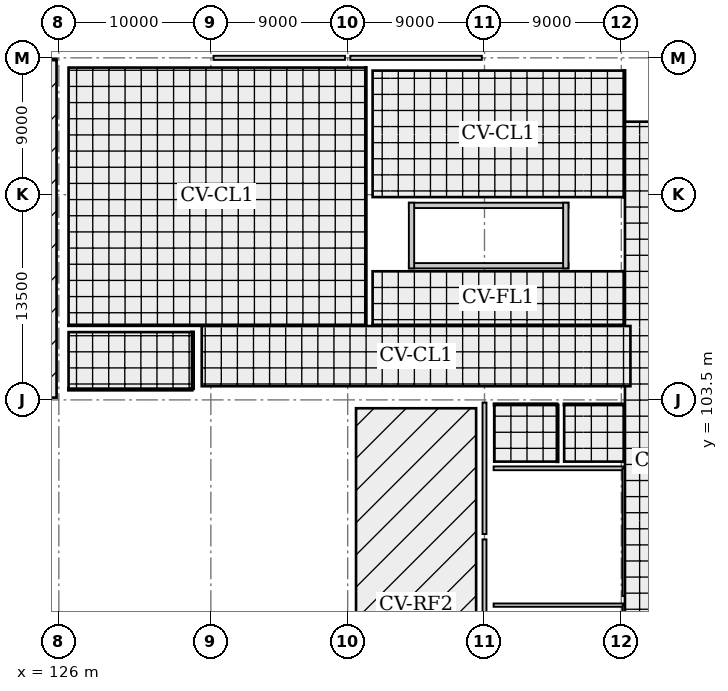
"""IFC4 building model, lengths in metres.
Left out: names, types, materials, properties, quantities, classifications, styles, units other than length and angle.
Written with IfcOpenShell. Run it as: python <this file> out.ifc"""

import sys

from ifc_helpers import new_model, si_unit, direction, frame, frame_2d, origin, origin_2d, place, context, subcontext, project, spatial, rectangle, i_section, extrude, element, fill, save


model = new_model("IFC4")
c1 = context("Model", 3, precision=1e-05, world=origin(), true_north=direction((0.0, 1.0)))
c2 = subcontext(c1, "Body", "Model", "MODEL_VIEW")
j1 = project(units=[si_unit("LENGTHUNIT", "METRE"), si_unit("PLANEANGLEUNIT", "RADIAN")], contexts=[c1])
p1 = place(None, origin())
s1 = spatial("IfcSite", under=j1, at=p1, CompositionType="ELEMENT")
p2 = place(p1, origin())
s2 = spatial("IfcBuilding", under=s1, at=p2, CompositionType="ELEMENT")
p3 = place(p2, frame((0.0, 0.0, 17.6)))
s3 = spatial("IfcBuildingStorey", under=s2, at=p3, CompositionType="ELEMENT", Elevation=17.6)
p4 = place(p3, frame((126.0, 103.5, 0.0), z_axis=(0.0, 0.0, 1.0), x_axis=(1.0, 0.0, 0.0)))
e1 = element("IfcColumn", 1, at=p4, inside=s3, PredefinedType="COLUMN", context=c2, shape_type="SweptSolid", body=[
    extrude(rectangle(XDim=0.9, YDim=0.9, at=origin_2d()), origin(), (0.0, 0.0, 1.0), 3.2),
])
for number, where, z_axis, x_axis in (
    (2, (126.0, 117.0, 0.0), (0.0, 0.0, 1.0), (1.0, 0.0, 0.0)),
    (3, (126.0, 126.0, 0.0), (0.0, 0.0, 1.0), (1.0, 0.0, 0.0)),
    (4, (136.0, 103.5, 0.0), (0.0, 0.0, 1.0), (1.0, 0.0, 0.0)),
    (5, (136.0, 117.0, 0.0), (0.0, 0.0, 1.0), (1.0, 0.0, 0.0)),
    (6, (136.0, 126.0, 0.0), (0.0, 0.0, 1.0), (1.0, 0.0, 0.0)),
    (7, (145.0, 103.5, 0.0), (0.0, 0.0, 1.0), (1.0, 0.0, 0.0)),
    (8, (145.0, 117.0, 0.0), (0.0, 0.0, 1.0), (1.0, 0.0, 0.0)),
    (9, (145.0, 126.0, 0.0), (0.0, 0.0, 1.0), (1.0, 0.0, 0.0)),
    (10, (154.0, 94.5, 0.0), (0.0, 0.0, 1.0), (1.0, 0.0, 0.0)),
    (11, (154.0, 103.5, 0.0), (0.0, 0.0, 1.0), (1.0, 0.0, 0.0)),
    (12, (154.0, 117.0, 0.0), (0.0, 0.0, 1.0), (1.0, 0.0, 0.0)),
    (13, (154.0, 126.0, 0.0), (0.0, 0.0, 1.0), (1.0, 0.0, 0.0)),
    (14, (163.0, 94.5, 0.0), (0.0, 0.0, 1.0), (1.0, 0.0, 0.0)),
    (15, (163.0, 103.5, 0.0), (0.0, 0.0, 1.0), (1.0, 0.0, 0.0)),
    (16, (163.0, 117.0, 0.0), (0.0, 0.0, 1.0), (1.0, 0.0, 0.0)),
    (17, (163.0, 126.0, 0.0), (0.0, 0.0, 1.0), (1.0, 0.0, 0.0)),
):
    element("IfcColumn", number, at=place(p3, frame(where, z_axis=z_axis, x_axis=x_axis)), inside=s3, PredefinedType="COLUMN", context=c2, shape_type="SweptSolid", body=[
        extrude(i_section(OverallWidth=0.35, OverallDepth=0.35, WebThickness=0.012, FlangeThickness=0.019, FilletRadius=0.02, at=origin_2d()), origin(), (0.0, 0.0, 1.0), 3.2),
    ])
p5 = place(p3, frame((136.175, 126.0, 0.0), z_axis=(0.0, 0.0, 1.0), x_axis=(1.0, 0.0, 0.0)))
e18 = element("IfcWall", 18, at=p5, inside=s3, PredefinedType="SOLIDWALL", context=c2, shape_type="SweptSolid", body=[
    extrude(rectangle(XDim=8.65, YDim=0.27, at=frame_2d((4.325, 0.0))), origin(), (0.0, 0.0, 1.0), 2.535),
])
p6 = place(p5, frame((1.69, 0.0, 0.9)))
e19 = element("IfcOpeningElement", 19, at=p6, cuts=e18, PredefinedType="OPENING", context=c2, shape_type="SweptSolid", body=[
    extrude(rectangle(XDim=1.15, YDim=1.45, at=frame_2d((0.575, 0.725))), frame((0.0, 0.145, 0.0), z_axis=(0.0, -1.0, 0.0), x_axis=(1.0, 0.0, 0.0)), (0.0, 0.0, 1.0), 0.29),
])
p7 = place(p5, frame((5.81, 0.0, 0.9)))
e20 = element("IfcOpeningElement", 20, at=p7, cuts=e18, PredefinedType="OPENING", context=c2, shape_type="SweptSolid", body=[
    extrude(rectangle(XDim=1.15, YDim=1.45, at=frame_2d((0.575, 0.725))), frame((0.0, 0.145, 0.0), z_axis=(0.0, -1.0, 0.0), x_axis=(1.0, 0.0, 0.0)), (0.0, 0.0, 1.0), 0.29),
])
p8 = place(p3, frame((145.175, 126.0, 0.0), z_axis=(0.0, 0.0, 1.0), x_axis=(1.0, 0.0, 0.0)))
e21 = element("IfcWall", 21, at=p8, inside=s3, PredefinedType="SOLIDWALL", context=c2, shape_type="SweptSolid", body=[
    extrude(rectangle(XDim=8.65, YDim=0.27, at=frame_2d((4.325, 0.0))), origin(), (0.0, 0.0, 1.0), 2.535),
])
p9 = place(p8, frame((1.69, 0.0, 0.9)))
e22 = element("IfcOpeningElement", 22, at=p9, cuts=e21, PredefinedType="OPENING", context=c2, shape_type="SweptSolid", body=[
    extrude(rectangle(XDim=1.15, YDim=1.45, at=frame_2d((0.575, 0.725))), frame((0.0, 0.145, 0.0), z_axis=(0.0, -1.0, 0.0), x_axis=(1.0, 0.0, 0.0)), (0.0, 0.0, 1.0), 0.29),
])
p10 = place(p8, frame((5.81, 0.0, 0.9)))
e23 = element("IfcOpeningElement", 23, at=p10, cuts=e21, PredefinedType="OPENING", context=c2, shape_type="SweptSolid", body=[
    extrude(rectangle(XDim=1.15, YDim=1.45, at=frame_2d((0.575, 0.725))), frame((0.0, 0.145, 0.0), z_axis=(0.0, -1.0, 0.0), x_axis=(1.0, 0.0, 0.0)), (0.0, 0.0, 1.0), 0.29),
])
p11 = place(p3, frame((154.0, 85.675, 0.0), z_axis=(0.0, 0.0, 1.0), x_axis=(0.0, 1.0, 0.0)))
e24 = element("IfcWall", 24, at=p11, inside=s3, PredefinedType="SOLIDWALL", context=c2, shape_type="SweptSolid", body=[
    extrude(rectangle(XDim=8.65, YDim=0.26, at=frame_2d((4.325, 0.0))), origin(), (0.0, 0.0, 1.0), 2.505),
])
p12 = place(p11, frame((3.625, 0.0, 0.75)))
e25 = element("IfcOpeningElement", 25, at=p12, cuts=e24, PredefinedType="OPENING", context=c2, shape_type="SweptSolid", body=[
    extrude(rectangle(XDim=1.4, YDim=1.55, at=frame_2d((0.7, 0.775))), frame((0.0, 0.14, 0.0), z_axis=(0.0, -1.0, 0.0), x_axis=(1.0, 0.0, 0.0)), (0.0, 0.0, 1.0), 0.28),
])
p13 = place(p3, frame((154.0, 94.675, 0.0), z_axis=(0.0, 0.0, 1.0), x_axis=(0.0, 1.0, 0.0)))
e26 = element("IfcWall", 26, at=p13, inside=s3, PredefinedType="SOLIDWALL", context=c2, shape_type="SweptSolid", body=[
    extrude(rectangle(XDim=8.65, YDim=0.26, at=frame_2d((4.325, 0.0))), origin(), (0.0, 0.0, 1.0), 2.505),
])
p14 = place(p13, frame((3.625, 0.0, 0.75)))
e27 = element("IfcOpeningElement", 27, at=p14, cuts=e26, PredefinedType="OPENING", context=c2, shape_type="SweptSolid", body=[
    extrude(rectangle(XDim=1.4, YDim=1.55, at=frame_2d((0.7, 0.775))), frame((0.0, 0.14, 0.0), z_axis=(0.0, -1.0, 0.0), x_axis=(1.0, 0.0, 0.0)), (0.0, 0.0, 1.0), 0.28),
])
p15 = place(p3, frame((117.15, 104.05, 0.0), z_axis=(0.0, 0.0, 1.0), x_axis=(1.0, 0.0, 0.0)))
e28 = element("IfcWall", 28, at=p15, inside=s3, PredefinedType="PARAPET", context=c2, shape_type="SweptSolid", body=[
    extrude(rectangle(XDim=8.7, YDim=0.18, at=frame_2d((4.35, 0.0))), origin(), (0.0, 0.0, 1.0), 0.85),
])
p16 = place(p3, frame((117.15, 125.85, 0.0), z_axis=(0.0, 0.0, 1.0), x_axis=(1.0, 0.0, 0.0)))
e29 = element("IfcWall", 29, at=p16, inside=s3, PredefinedType="PARAPET", context=c2, shape_type="SweptSolid", body=[
    extrude(rectangle(XDim=8.7, YDim=0.18, at=frame_2d((4.35, 0.0))), origin(), (0.0, 0.0, 1.0), 1.15),
])
p17 = place(p3, frame((149.025, 112.325, 0.0), z_axis=(0.0, 0.0, 1.0), x_axis=(1.0, 0.0, 0.0)))
e30 = element("IfcWall", 30, at=p17, inside=s3, PredefinedType="SHEAR", context=c2, shape_type="SweptSolid", body=[
    extrude(rectangle(XDim=10.498, YDim=0.35, at=frame_2d((5.249, 0.0))), origin(), (0.0, 0.0, 1.0), 3.02),
])
p18 = place(p17, frame((0.55, 0.0, 0.0)))
e31 = element("IfcOpeningElement", 31, at=p18, cuts=e30, PredefinedType="OPENING", context=c2, shape_type="SweptSolid", body=[
    extrude(rectangle(XDim=1.3, YDim=2.1, at=frame_2d((0.65, 1.05))), frame((0.0, 0.185, 0.0), z_axis=(0.0, -1.0, 0.0), x_axis=(1.0, 0.0, 0.0)), (0.0, 0.0, 1.0), 0.37),
])
p19 = place(p3, frame((159.522, 116.295, 0.0), z_axis=(0.0, 0.0, 1.0), x_axis=(-1.0, 0.0, 0.0)))
e32 = element("IfcWall", 32, at=p19, inside=s3, PredefinedType="SHEAR", context=c2, shape_type="SweptSolid", body=[
    extrude(rectangle(XDim=10.498, YDim=0.35, at=frame_2d((5.249, 0.0))), origin(), (0.0, 0.0, 1.0), 3.02),
])
for number, where, z_axis, x_axis in (
    (33, (159.347, 112.15, 0.0), (0.0, 0.0, 1.0), (0.0, 1.0, 0.0)),
    (34, (149.2, 116.47, 0.0), (0.0, 0.0, 1.0), (0.0, -1.0, 0.0)),
):
    element("IfcWall", number, at=place(p3, frame(where, z_axis=z_axis, x_axis=x_axis)), inside=s3, PredefinedType="SHEAR", context=c2, shape_type="SweptSolid", body=[
        extrude(rectangle(XDim=4.32, YDim=0.35, at=frame_2d((2.16, 0.0))), origin(), (0.0, 0.0, 1.0), 3.02),
    ])
p20 = place(p3, frame((146.2, 108.4, 0.0), z_axis=(0.0, 0.0, 1.0), x_axis=(-1.0, 0.0, 0.0)))
e35 = element("IfcWall", 35, at=p20, inside=s3, PredefinedType="PARTITIONING", context=c2, shape_type="SweptSolid", body=[
    extrude(rectangle(XDim=19.6, YDim=0.11, at=frame_2d((9.8, 0.0))), origin(), (0.0, 0.0, 1.0), 2.395),
])
p21 = place(p20, frame((9.05, 0.0, 0.0)))
e36 = element("IfcOpeningElement", 36, at=p21, cuts=e35, PredefinedType="OPENING", context=c2, shape_type="SweptSolid", body=[
    extrude(rectangle(XDim=1.5, YDim=2.15, at=frame_2d((0.75, 1.075))), frame((0.0, 0.065, 0.0), z_axis=(0.0, -1.0, 0.0), x_axis=(1.0, 0.0, 0.0)), (0.0, 0.0, 1.0), 0.13),
])
p22 = place(p3, frame((146.2, 125.4, 0.0), z_axis=(0.0, 0.0, 1.0), x_axis=(0.0, -1.0, 0.0)))
e37 = element("IfcWall", 37, at=p22, inside=s3, PredefinedType="PARTITIONING", context=c2, shape_type="SweptSolid", body=[
    extrude(rectangle(XDim=17.0, YDim=0.11, at=frame_2d((8.5, 0.0))), origin(), (0.0, 0.0, 1.0), 2.535),
])
p23 = place(p3, frame((154.6, 90.0, 0.0), z_axis=(0.0, 0.0, 1.0), x_axis=(1.0, 0.0, 0.0)))
e38 = element("IfcWall", 38, at=p23, inside=s3, PredefinedType="SOLIDWALL", context=c2, shape_type="SweptSolid", body=[
    extrude(rectangle(XDim=8.6, YDim=0.22, at=frame_2d((4.3, 0.0))), origin(), (0.0, 0.0, 1.0), 2.555),
])
p24 = place(p3, frame((163.2, 90.0, 0.0), z_axis=(0.0, 0.0, 1.0), x_axis=(0.0, -1.0, 0.0)))
e39 = element("IfcWall", 39, at=p24, inside=s3, PredefinedType="SOLIDWALL", context=c2, shape_type="SweptSolid", body=[
    extrude(rectangle(XDim=13.0, YDim=0.22, at=frame_2d((6.5, 0.0))), origin(), (0.0, 0.0, 1.0), 2.505),
])
p25 = place(p24, frame((5.85, 0.0, 0.0)))
e40 = element("IfcOpeningElement", 40, at=p25, cuts=e39, PredefinedType="OPENING", context=c2, shape_type="SweptSolid", body=[
    extrude(rectangle(XDim=1.3, YDim=2.1, at=frame_2d((0.65, 1.05))), frame((0.0, 0.12, 0.0), z_axis=(0.0, -1.0, 0.0), x_axis=(1.0, 0.0, 0.0)), (0.0, 0.0, 1.0), 0.24),
])
p26 = place(p3, frame((154.6, 99.0, 0.0), z_axis=(0.0, 0.0, 1.0), x_axis=(1.0, 0.0, 0.0)))
e41 = element("IfcWall", 41, at=p26, inside=s3, PredefinedType="SOLIDWALL", context=c2, shape_type="SweptSolid", body=[
    extrude(rectangle(XDim=8.6, YDim=0.25, at=frame_2d((4.3, 0.0))), origin(), (0.0, 0.0, 1.0), 2.555),
])
p27 = place(p3, frame((163.2, 99.0, 0.0), z_axis=(0.0, 0.0, 1.0), x_axis=(0.0, -1.0, 0.0)))
e42 = element("IfcWall", 42, at=p27, inside=s3, PredefinedType="SOLIDWALL", context=c2, shape_type="SweptSolid", body=[
    extrude(rectangle(XDim=8.4, YDim=0.25, at=frame_2d((4.2, 0.0))), origin(), (0.0, 0.0, 1.0), 2.505),
])
p28 = place(p27, frame((2.55, 0.0, 0.0)))
e43 = element("IfcOpeningElement", 43, at=p28, cuts=e42, PredefinedType="OPENING", context=c2, shape_type="SweptSolid", body=[
    extrude(rectangle(XDim=1.3, YDim=2.1, at=frame_2d((0.65, 1.05))), frame((0.0, 0.135, 0.0), z_axis=(0.0, -1.0, 0.0), x_axis=(1.0, 0.0, 0.0)), (0.0, 0.0, 1.0), 0.27),
])
p29 = place(p3, frame((163.2, 125.2, 0.0), z_axis=(0.0, 0.0, 1.0), x_axis=(0.0, -1.0, 0.0)))
e44 = element("IfcWall", 44, at=p29, inside=s3, PredefinedType="PARTITIONING", context=c2, shape_type="SweptSolid", body=[
    extrude(rectangle(XDim=8.4, YDim=0.15, at=frame_2d((4.2, 0.0))), origin(), (0.0, 0.0, 1.0), 2.355),
])
p30 = place(p29, frame((3.575, 0.0, 0.0)))
e45 = element("IfcOpeningElement", 45, at=p30, cuts=e44, PredefinedType="OPENING", context=c2, shape_type="SweptSolid", body=[
    extrude(rectangle(XDim=1.25, YDim=2.1, at=frame_2d((0.625, 1.05))), frame((0.0, 0.085, 0.0), z_axis=(0.0, -1.0, 0.0), x_axis=(1.0, 0.0, 0.0)), (0.0, 0.0, 1.0), 0.17),
])
p31 = place(p3, frame((163.2, 108.4, 0.0), z_axis=(0.0, 0.0, 1.0), x_axis=(-1.0, 0.0, 0.0)))
e46 = element("IfcWall", 46, at=p31, inside=s3, PredefinedType="PARTITIONING", context=c2, shape_type="SweptSolid", body=[
    extrude(rectangle(XDim=16.6, YDim=0.11, at=frame_2d((8.3, 0.0))), origin(), (0.0, 0.0, 1.0), 2.355),
])
p32 = place(p31, frame((7.725, 0.0, 0.0)))
e47 = element("IfcOpeningElement", 47, at=p32, cuts=e46, PredefinedType="OPENING", context=c2, shape_type="SweptSolid", body=[
    extrude(rectangle(XDim=1.15, YDim=2.1, at=frame_2d((0.575, 1.05))), frame((0.0, 0.065, 0.0), z_axis=(0.0, -1.0, 0.0), x_axis=(1.0, 0.0, 0.0)), (0.0, 0.0, 1.0), 0.13),
])
p33 = place(p3, frame((163.2, 112.0, 0.0), z_axis=(0.0, 0.0, 1.0), x_axis=(0.0, -1.0, 0.0)))
e48 = element("IfcWall", 48, at=p33, inside=s3, PredefinedType="PARTITIONING", context=c2, shape_type="SweptSolid", body=[
    extrude(rectangle(XDim=3.6, YDim=0.11, at=frame_2d((1.8, 0.0))), origin(), (0.0, 0.0, 1.0), 2.355),
])
p34 = place(p3, frame((154.6, 103.2, 0.0), z_axis=(0.0, 0.0, 1.0), x_axis=(1.0, 0.0, 0.0)))
e49 = element("IfcWall", 49, at=p34, inside=s3, PredefinedType="PARTITIONING", context=c2, shape_type="SweptSolid", body=[
    extrude(rectangle(XDim=4.2, YDim=0.15, at=frame_2d((2.1, 0.0))), origin(), (0.0, 0.0, 1.0), 2.505),
])
p35 = place(p34, frame((1.65, 0.0, 0.0)))
e50 = element("IfcOpeningElement", 50, at=p35, cuts=e49, PredefinedType="OPENING", context=c2, shape_type="SweptSolid", body=[
    extrude(rectangle(XDim=0.9, YDim=2.1, at=frame_2d((0.45, 1.05))), frame((0.0, 0.085, 0.0), z_axis=(0.0, -1.0, 0.0), x_axis=(1.0, 0.0, 0.0)), (0.0, 0.0, 1.0), 0.17),
])
p36 = place(p3, frame((158.8, 103.2, 0.0), z_axis=(0.0, 0.0, 1.0), x_axis=(0.0, -1.0, 0.0)))
e51 = element("IfcWall", 51, at=p36, inside=s3, PredefinedType="PARTITIONING", context=c2, shape_type="SweptSolid", body=[
    extrude(rectangle(XDim=3.8, YDim=0.15, at=frame_2d((1.9, 0.0))), origin(), (0.0, 0.0, 1.0), 2.505),
])
p37 = place(p3, frame((159.2, 103.2, 0.0), z_axis=(0.0, 0.0, 1.0), x_axis=(1.0, 0.0, 0.0)))
e52 = element("IfcWall", 52, at=p37, inside=s3, PredefinedType="PARTITIONING", context=c2, shape_type="SweptSolid", body=[
    extrude(rectangle(XDim=4.0, YDim=0.14, at=frame_2d((2.0, 0.0))), origin(), (0.0, 0.0, 1.0), 2.355),
])
p38 = place(p37, frame((1.55, 0.0, 0.0)))
e53 = element("IfcOpeningElement", 53, at=p38, cuts=e52, PredefinedType="OPENING", context=c2, shape_type="SweptSolid", body=[
    extrude(rectangle(XDim=0.9, YDim=2.1, at=frame_2d((0.45, 1.05))), frame((0.0, 0.08, 0.0), z_axis=(0.0, -1.0, 0.0), x_axis=(1.0, 0.0, 0.0)), (0.0, 0.0, 1.0), 0.16),
])
p39 = place(p3, frame((163.2, 103.2, 0.0), z_axis=(0.0, 0.0, 1.0), x_axis=(0.0, -1.0, 0.0)))
e54 = element("IfcWall", 54, at=p39, inside=s3, PredefinedType="PARTITIONING", context=c2, shape_type="SweptSolid", body=[
    extrude(rectangle(XDim=3.8, YDim=0.14, at=frame_2d((1.9, 0.0))), origin(), (0.0, 0.0, 1.0), 2.355),
])
p40 = place(p3, frame((134.8, 104.2, 0.0), z_axis=(0.0, 0.0, 1.0), x_axis=(-1.0, 0.0, 0.0)))
e55 = element("IfcWall", 55, at=p40, inside=s3, PredefinedType="PARTITIONING", context=c2, shape_type="SweptSolid", body=[
    extrude(rectangle(XDim=8.2, YDim=0.19, at=frame_2d((4.1, 0.0))), origin(), (0.0, 0.0, 1.0), 2.41),
])
p41 = place(p3, frame((134.8, 108.0, 0.0), z_axis=(0.0, 0.0, 1.0), x_axis=(0.0, -1.0, 0.0)))
e56 = element("IfcWall", 56, at=p41, inside=s3, PredefinedType="PARTITIONING", context=c2, shape_type="SweptSolid", body=[
    extrude(rectangle(XDim=3.8, YDim=0.19, at=frame_2d((1.9, 0.0))), origin(), (0.0, 0.0, 1.0), 2.51),
])
p42 = place(p41, frame((1.375, 0.0, 0.0)))
e57 = element("IfcOpeningElement", 57, at=p42, cuts=e56, PredefinedType="OPENING", context=c2, shape_type="SweptSolid", body=[
    extrude(rectangle(XDim=1.05, YDim=2.1, at=frame_2d((0.525, 1.05))), frame((0.0, 0.105, 0.0), z_axis=(0.0, -1.0, 0.0), x_axis=(1.0, 0.0, 0.0)), (0.0, 0.0, 1.0), 0.21),
])
p43 = place(p6, origin())
e58 = element("IfcWindow", 58, at=p43, inside=s3, PartitioningType="SINGLE_PANEL", PredefinedType="WINDOW", context=c2, shape_type="SweptSolid", body=[
    extrude(rectangle(XDim=1.15, YDim=1.45, at=frame_2d((0.575, 0.725))), frame((0.0, 0.03, 0.0), z_axis=(0.0, -1.0, 0.0), x_axis=(1.0, 0.0, 0.0)), (0.0, 0.0, 1.0), 0.06),
])
fill(e19, e58)
p44 = place(p7, origin())
e59 = element("IfcWindow", 59, at=p44, inside=s3, PartitioningType="SINGLE_PANEL", PredefinedType="WINDOW", context=c2, shape_type="SweptSolid", body=[
    extrude(rectangle(XDim=1.15, YDim=1.45, at=frame_2d((0.575, 0.725))), frame((0.0, 0.03, 0.0), z_axis=(0.0, -1.0, 0.0), x_axis=(1.0, 0.0, 0.0)), (0.0, 0.0, 1.0), 0.06),
])
fill(e20, e59)
p45 = place(p9, origin())
e60 = element("IfcWindow", 60, at=p45, inside=s3, PartitioningType="SINGLE_PANEL", PredefinedType="WINDOW", context=c2, shape_type="SweptSolid", body=[
    extrude(rectangle(XDim=1.15, YDim=1.45, at=frame_2d((0.575, 0.725))), frame((0.0, 0.03, 0.0), z_axis=(0.0, -1.0, 0.0), x_axis=(1.0, 0.0, 0.0)), (0.0, 0.0, 1.0), 0.06),
])
fill(e22, e60)
p46 = place(p10, origin())
e61 = element("IfcWindow", 61, at=p46, inside=s3, PartitioningType="SINGLE_PANEL", PredefinedType="WINDOW", context=c2, shape_type="SweptSolid", body=[
    extrude(rectangle(XDim=1.15, YDim=1.45, at=frame_2d((0.575, 0.725))), frame((0.0, 0.03, 0.0), z_axis=(0.0, -1.0, 0.0), x_axis=(1.0, 0.0, 0.0)), (0.0, 0.0, 1.0), 0.06),
])
fill(e23, e61)
p47 = place(p12, origin())
e62 = element("IfcWindow", 62, at=p47, inside=s3, PartitioningType="SINGLE_PANEL", PredefinedType="WINDOW", context=c2, shape_type="SweptSolid", body=[
    extrude(rectangle(XDim=1.4, YDim=1.55, at=frame_2d((0.7, 0.775))), frame((0.0, 0.03, 0.0), z_axis=(0.0, -1.0, 0.0), x_axis=(1.0, 0.0, 0.0)), (0.0, 0.0, 1.0), 0.06),
])
fill(e25, e62)
p48 = place(p14, origin())
e63 = element("IfcWindow", 63, at=p48, inside=s3, PartitioningType="SINGLE_PANEL", PredefinedType="WINDOW", context=c2, shape_type="SweptSolid", body=[
    extrude(rectangle(XDim=1.4, YDim=1.55, at=frame_2d((0.7, 0.775))), frame((0.0, 0.03, 0.0), z_axis=(0.0, -1.0, 0.0), x_axis=(1.0, 0.0, 0.0)), (0.0, 0.0, 1.0), 0.06),
])
fill(e27, e63)
p49 = place(p18, origin())
e64 = element("IfcDoor", 64, at=p49, inside=s3, OperationType="SINGLE_SWING_RIGHT", PredefinedType="DOOR", context=c2, shape_type="SweptSolid", body=[
    extrude(rectangle(XDim=1.3, YDim=2.1, at=frame_2d((0.65, 1.05))), frame((0.0, 0.025, 0.0), z_axis=(0.0, -1.0, 0.0), x_axis=(1.0, 0.0, 0.0)), (0.0, 0.0, 1.0), 0.05),
])
fill(e31, e64)
p50 = place(p21, origin())
e65 = element("IfcDoor", 65, at=p50, inside=s3, OperationType="SINGLE_SWING_RIGHT", PredefinedType="DOOR", context=c2, shape_type="SweptSolid", body=[
    extrude(rectangle(XDim=1.5, YDim=2.15, at=frame_2d((0.75, 1.075))), frame((0.0, 0.025, 0.0), z_axis=(0.0, -1.0, 0.0), x_axis=(1.0, 0.0, 0.0)), (0.0, 0.0, 1.0), 0.05),
])
fill(e36, e65)
p51 = place(p28, origin())
e66 = element("IfcDoor", 66, at=p51, inside=s3, OperationType="SINGLE_SWING_RIGHT", PredefinedType="DOOR", context=c2, shape_type="SweptSolid", body=[
    extrude(rectangle(XDim=1.3, YDim=2.1, at=frame_2d((0.65, 1.05))), frame((0.0, 0.025, 0.0), z_axis=(0.0, -1.0, 0.0), x_axis=(1.0, 0.0, 0.0)), (0.0, 0.0, 1.0), 0.05),
])
fill(e43, e66)
p52 = place(p30, origin())
e67 = element("IfcDoor", 67, at=p52, inside=s3, OperationType="SINGLE_SWING_LEFT", PredefinedType="DOOR", context=c2, shape_type="SweptSolid", body=[
    extrude(rectangle(XDim=1.25, YDim=2.1, at=frame_2d((0.625, 1.05))), frame((0.0, 0.025, 0.0), z_axis=(0.0, -1.0, 0.0), x_axis=(1.0, 0.0, 0.0)), (0.0, 0.0, 1.0), 0.05),
])
fill(e45, e67)
p53 = place(p32, origin())
e68 = element("IfcDoor", 68, at=p53, inside=s3, OperationType="SINGLE_SWING_LEFT", PredefinedType="DOOR", context=c2, shape_type="SweptSolid", body=[
    extrude(rectangle(XDim=1.15, YDim=2.1, at=frame_2d((0.575, 1.05))), frame((0.0, 0.025, 0.0), z_axis=(0.0, -1.0, 0.0), x_axis=(1.0, 0.0, 0.0)), (0.0, 0.0, 1.0), 0.05),
])
fill(e47, e68)
p54 = place(p35, origin())
e69 = element("IfcDoor", 69, at=p54, inside=s3, OperationType="SINGLE_SWING_LEFT", PredefinedType="DOOR", context=c2, shape_type="SweptSolid", body=[
    extrude(rectangle(XDim=0.9, YDim=2.1, at=frame_2d((0.45, 1.05))), frame((0.0, 0.025, 0.0), z_axis=(0.0, -1.0, 0.0), x_axis=(1.0, 0.0, 0.0)), (0.0, 0.0, 1.0), 0.05),
])
fill(e50, e69)
p55 = place(p38, origin())
e70 = element("IfcDoor", 70, at=p55, inside=s3, OperationType="SINGLE_SWING_RIGHT", PredefinedType="DOOR", context=c2, shape_type="SweptSolid", body=[
    extrude(rectangle(XDim=0.9, YDim=2.1, at=frame_2d((0.45, 1.05))), frame((0.0, 0.025, 0.0), z_axis=(0.0, -1.0, 0.0), x_axis=(1.0, 0.0, 0.0)), (0.0, 0.0, 1.0), 0.05),
])
fill(e53, e70)
p56 = place(p42, origin())
e71 = element("IfcDoor", 71, at=p56, inside=s3, OperationType="SINGLE_SWING_RIGHT", PredefinedType="DOOR", context=c2, shape_type="SweptSolid", body=[
    extrude(rectangle(XDim=1.05, YDim=2.1, at=frame_2d((0.525, 1.05))), frame((0.0, 0.025, 0.0), z_axis=(0.0, -1.0, 0.0), x_axis=(1.0, 0.0, 0.0)), (0.0, 0.0, 1.0), 0.05),
])
fill(e57, e71)
save(model, sys.argv[1])
